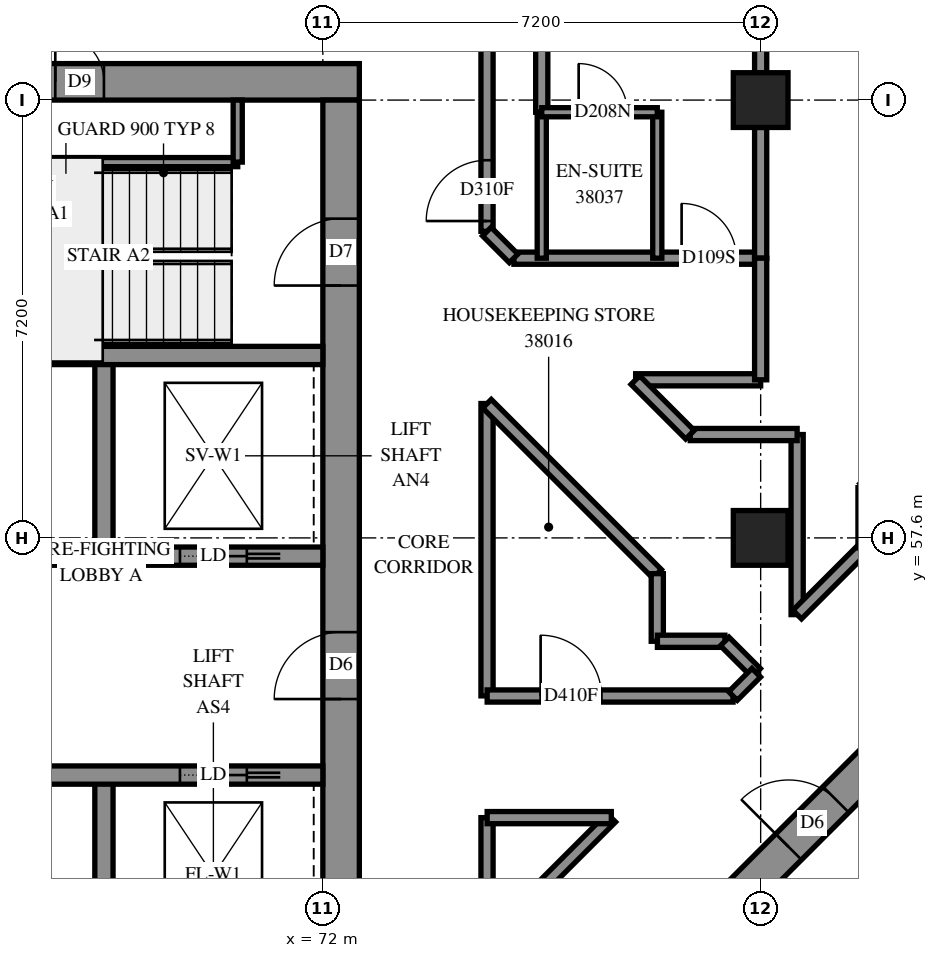
"""IFC4 building model, lengths in metres.
Left out: names, types, materials, properties, quantities, classifications, styles, units other than length and angle.
Written with IfcOpenShell. Run it as: python <this file> out.ifc"""

import sys

from ifc_helpers import new_model, si_unit, direction, frame, frame_2d, origin, origin_2d, place, context, subcontext, project, spatial, rectangle, extrude, element, fill, save


model = new_model("IFC4")
c1 = context("Model", 3, precision=1e-05, world=origin(), true_north=direction((0.0, 1.0)))
c2 = subcontext(c1, "Body", "Model", "MODEL_VIEW")
j1 = project(units=[si_unit("LENGTHUNIT", "METRE"), si_unit("PLANEANGLEUNIT", "RADIAN")], contexts=[c1])
p1 = place(None, origin())
s1 = spatial("IfcSite", under=j1, at=p1, CompositionType="ELEMENT")
p2 = place(p1, origin())
s2 = spatial("IfcBuilding", under=s1, at=p2, CompositionType="ELEMENT")
p3 = place(p2, frame((0.0, 0.0, 142.2)))
s3 = spatial("IfcBuildingStorey", under=s2, at=p3, CompositionType="ELEMENT", Elevation=142.2)
for number, where, z_axis, x_axis in (
    (1, (79.2, 57.6, 0.0), (0.0, 0.0, 1.0), (1.0, 0.0, 0.0)),
    (2, (79.2, 64.8, 0.0), (0.0, 0.0, 1.0), (1.0, 0.0, 0.0)),
):
    element("IfcColumn", number, at=place(p3, frame(where, z_axis=z_axis, x_axis=x_axis)), inside=s3, PredefinedType="COLUMN", context=c2, shape_type="SweptSolid", body=[
        extrude(rectangle(XDim=0.9, YDim=0.9, at=origin_2d()), origin(), (0.0, 0.0, 1.0), 3.1),
    ])
p4 = place(p3, frame((57.0, 65.1, -0.3), z_axis=(0.0, 0.0, 1.0), x_axis=(1.0, 0.0, 0.0)))
e3 = element("IfcWall", 3, at=p4, inside=s3, PredefinedType="SHEAR", context=c2, shape_type="SweptSolid", body=[
    extrude(rectangle(XDim=15.6, YDim=0.6, at=frame_2d((7.8, 0.0))), origin(), (0.0, 0.0, 1.0), 2.7),
])
p5 = place(p4, frame((10.6, 0.0, 0.3)))
e4 = element("IfcOpeningElement", 4, at=p5, cuts=e3, PredefinedType="OPENING", context=c2, shape_type="SweptSolid", body=[
    extrude(rectangle(XDim=0.8, YDim=2.1, at=frame_2d((0.4, 1.05))), frame((0.0, 0.31, 0.0), z_axis=(0.0, -1.0, 0.0), x_axis=(1.0, 0.0, 0.0)), (0.0, 0.0, 1.0), 0.62),
])
p6 = place(p3, frame((72.3, 50.4, -0.3), z_axis=(0.0, 0.0, 1.0), x_axis=(0.0, 1.0, 0.0)))
e5 = element("IfcWall", 5, at=p6, inside=s3, PredefinedType="SHEAR", context=c2, shape_type="SweptSolid", body=[
    extrude(rectangle(XDim=14.4, YDim=0.6, at=frame_2d((7.2, 0.0))), origin(), (0.0, 0.0, 1.0), 2.7),
])
p7 = place(p6, frame((4.55, 0.0, 0.3)))
e6 = element("IfcOpeningElement", 6, at=p7, cuts=e5, PredefinedType="OPENING", context=c2, shape_type="SweptSolid", body=[
    extrude(rectangle(XDim=1.1, YDim=2.1, at=frame_2d((0.55, 1.05))), frame((0.0, 0.31, 0.0), z_axis=(0.0, -1.0, 0.0), x_axis=(1.0, 0.0, 0.0)), (0.0, 0.0, 1.0), 0.62),
])
p8 = place(p6, frame((11.35, 0.0, 0.3)))
e7 = element("IfcOpeningElement", 7, at=p8, cuts=e5, PredefinedType="OPENING", context=c2, shape_type="SweptSolid", body=[
    extrude(rectangle(XDim=1.1, YDim=2.1, at=frame_2d((0.55, 1.05))), frame((0.0, 0.31, 0.0), z_axis=(0.0, -1.0, 0.0), x_axis=(1.0, 0.0, 0.0)), (0.0, 0.0, 1.0), 0.62),
])
for number, where, z_axis, x_axis in (
    (8, (68.4, 50.4, 0.0), (0.0, 0.0, 1.0), (0.0, 1.0, 0.0)),
    (9, (68.4, 57.3, 0.0), (0.0, 0.0, 1.0), (0.0, 1.0, 0.0)),
):
    element("IfcWall", number, at=place(p3, frame(where, z_axis=z_axis, x_axis=x_axis)), inside=s3, PredefinedType="SOLIDWALL", context=c2, shape_type="SweptSolid", body=[
        extrude(rectangle(XDim=3.3, YDim=0.3, at=frame_2d((1.65, 0.0))), origin(), (0.0, 0.0, 1.0), 3.1),
    ])
p9 = place(p3, frame((57.6, 53.7, 0.0), z_axis=(0.0, 0.0, 1.0), x_axis=(1.0, 0.0, 0.0)))
e10 = element("IfcWall", 10, at=p9, inside=s3, PredefinedType="SOLIDWALL", context=c2, shape_type="SweptSolid", body=[
    extrude(rectangle(XDim=14.4, YDim=0.3, at=frame_2d((7.2, 0.0))), origin(), (0.0, 0.0, 1.0), 3.1),
])
p10 = place(p9, frame((1.35, 0.0, 0.0)))
e11 = element("IfcOpeningElement", 11, at=p10, cuts=e10, PredefinedType="OPENING", context=c2, shape_type="SweptSolid", body=[
    extrude(rectangle(XDim=0.9, YDim=2.1, at=frame_2d((0.45, 1.05))), frame((0.0, 0.16, 0.0), z_axis=(0.0, -1.0, 0.0), x_axis=(1.0, 0.0, 0.0)), (0.0, 0.0, 1.0), 0.32),
])
p11 = place(p9, frame((4.95, 0.0, 0.0)))
e12 = element("IfcOpeningElement", 12, at=p11, cuts=e10, PredefinedType="OPENING", context=c2, shape_type="SweptSolid", body=[
    extrude(rectangle(XDim=0.9, YDim=2.1, at=frame_2d((0.45, 1.05))), frame((0.0, 0.16, 0.0), z_axis=(0.0, -1.0, 0.0), x_axis=(1.0, 0.0, 0.0)), (0.0, 0.0, 1.0), 0.32),
])
p12 = place(p9, frame((8.55, 0.0, 0.0)))
e13 = element("IfcOpeningElement", 13, at=p12, cuts=e10, PredefinedType="OPENING", context=c2, shape_type="SweptSolid", body=[
    extrude(rectangle(XDim=0.9, YDim=2.1, at=frame_2d((0.45, 1.05))), frame((0.0, 0.16, 0.0), z_axis=(0.0, -1.0, 0.0), x_axis=(1.0, 0.0, 0.0)), (0.0, 0.0, 1.0), 0.32),
])
p13 = place(p9, frame((12.05, 0.0, 0.0)))
e14 = element("IfcOpeningElement", 14, at=p13, cuts=e10, PredefinedType="OPENING", context=c2, shape_type="SweptSolid", body=[
    extrude(rectangle(XDim=1.1, YDim=2.1, at=frame_2d((0.55, 1.05))), frame((0.0, 0.16, 0.0), z_axis=(0.0, -1.0, 0.0), x_axis=(1.0, 0.0, 0.0)), (0.0, 0.0, 1.0), 0.32),
])
p14 = place(p3, frame((57.6, 57.3, 0.0), z_axis=(0.0, 0.0, 1.0), x_axis=(1.0, 0.0, 0.0)))
e15 = element("IfcWall", 15, at=p14, inside=s3, PredefinedType="SOLIDWALL", context=c2, shape_type="SweptSolid", body=[
    extrude(rectangle(XDim=14.4, YDim=0.3, at=frame_2d((7.2, 0.0))), origin(), (0.0, 0.0, 1.0), 3.1),
])
p15 = place(p14, frame((1.25, 0.0, 0.0)))
e16 = element("IfcOpeningElement", 16, at=p15, cuts=e15, PredefinedType="OPENING", context=c2, shape_type="SweptSolid", body=[
    extrude(rectangle(XDim=1.1, YDim=2.1, at=frame_2d((0.55, 1.05))), frame((0.0, 0.16, 0.0), z_axis=(0.0, -1.0, 0.0), x_axis=(1.0, 0.0, 0.0)), (0.0, 0.0, 1.0), 0.32),
])
p16 = place(p14, frame((4.85, 0.0, 0.0)))
e17 = element("IfcOpeningElement", 17, at=p16, cuts=e15, PredefinedType="OPENING", context=c2, shape_type="SweptSolid", body=[
    extrude(rectangle(XDim=1.1, YDim=2.1, at=frame_2d((0.55, 1.05))), frame((0.0, 0.16, 0.0), z_axis=(0.0, -1.0, 0.0), x_axis=(1.0, 0.0, 0.0)), (0.0, 0.0, 1.0), 0.32),
])
p17 = place(p14, frame((8.45, 0.0, 0.0)))
e18 = element("IfcOpeningElement", 18, at=p17, cuts=e15, PredefinedType="OPENING", context=c2, shape_type="SweptSolid", body=[
    extrude(rectangle(XDim=1.1, YDim=2.1, at=frame_2d((0.55, 1.05))), frame((0.0, 0.16, 0.0), z_axis=(0.0, -1.0, 0.0), x_axis=(1.0, 0.0, 0.0)), (0.0, 0.0, 1.0), 0.32),
])
p18 = place(p14, frame((12.05, 0.0, 0.0)))
e19 = element("IfcOpeningElement", 19, at=p18, cuts=e15, PredefinedType="OPENING", context=c2, shape_type="SweptSolid", body=[
    extrude(rectangle(XDim=1.1, YDim=2.1, at=frame_2d((0.55, 1.05))), frame((0.0, 0.16, 0.0), z_axis=(0.0, -1.0, 0.0), x_axis=(1.0, 0.0, 0.0)), (0.0, 0.0, 1.0), 0.32),
])
p19 = place(p3, frame((64.8, 60.6, 0.0), z_axis=(0.0, 0.0, 1.0), x_axis=(1.0, 0.0, 0.0)))
e20 = element("IfcWall", 20, at=p19, inside=s3, PredefinedType="SOLIDWALL", context=c2, shape_type="SweptSolid", body=[
    extrude(rectangle(XDim=7.2, YDim=0.3, at=frame_2d((3.6, 0.0))), origin(), (0.0, 0.0, 1.0), 3.1),
])
p20 = place(p3, frame((76.442, 49.302, -0.3), z_axis=(0.0, 0.0, 1.0), x_axis=(0.7071067812, 0.7071067812, 0.0)))
e21 = element("IfcWall", 21, at=p20, inside=s3, PredefinedType="SHEAR", context=c2, shape_type="SweptSolid", body=[
    extrude(rectangle(XDim=14.4, YDim=0.6, at=frame_2d((7.2, 0.0))), origin(), (0.0, 0.0, 1.0), 2.7),
])
p21 = place(p20, frame((4.55, 0.0, 0.3)))
e22 = element("IfcOpeningElement", 22, at=p21, cuts=e21, PredefinedType="OPENING", context=c2, shape_type="SweptSolid", body=[
    extrude(rectangle(XDim=1.1, YDim=2.1, at=frame_2d((0.55, 1.05))), frame((0.0, 0.31, 0.0), z_axis=(0.0, -1.0, 0.0), x_axis=(1.0, 0.0, 0.0)), (0.0, 0.0, 1.0), 0.62),
])
p22 = place(p20, frame((11.35, 0.0, 0.3)))
e23 = element("IfcOpeningElement", 23, at=p22, cuts=e21, PredefinedType="OPENING", context=c2, shape_type="SweptSolid", body=[
    extrude(rectangle(XDim=1.1, YDim=2.1, at=frame_2d((0.55, 1.05))), frame((0.0, 0.31, 0.0), z_axis=(0.0, -1.0, 0.0), x_axis=(1.0, 0.0, 0.0)), (0.0, 0.0, 1.0), 0.62),
])
p23 = place(p3, frame((64.95, 63.78, 0.0), z_axis=(0.0, 0.0, 1.0), x_axis=(1.0, 0.0, 0.0)))
e24 = element("IfcWall", 24, at=p23, inside=s3, PredefinedType="PARTITIONING", context=c2, shape_type="SweptSolid", body=[
    extrude(rectangle(XDim=5.65, YDim=0.15, at=frame_2d((2.825, 0.0))), origin(), (0.0, 0.0, 1.0), 3.1),
])
p24 = place(p3, frame((70.6, 63.78, 0.0), z_axis=(0.0, 0.0, 1.0), x_axis=(0.0, 1.0, 0.0)))
e25 = element("IfcWall", 25, at=p24, inside=s3, PredefinedType="PARTITIONING", context=c2, shape_type="SweptSolid", body=[
    extrude(rectangle(XDim=1.02, YDim=0.15, at=frame_2d((0.51, 0.0))), origin(), (0.0, 0.0, 1.0), 3.1),
])
p25 = place(p3, frame((75.6, 64.6, 0.0), z_axis=(0.0, 0.0, 1.0), x_axis=(0.0, 1.0, 0.0)))
e26 = element("IfcWall", 26, at=p25, inside=s3, PredefinedType="PARTITIONING", context=c2, shape_type="SweptSolid", body=[
    extrude(rectangle(XDim=8.165, YDim=0.2, at=frame_2d((4.082, 0.0))), origin(), (0.0, 0.0, 1.0), 3.1),
])
p26 = place(p3, frame((79.2, 65.25, 0.0), z_axis=(0.0, 0.0, 1.0), x_axis=(0.0, 1.0, 0.0)))
e27 = element("IfcWall", 27, at=p26, inside=s3, PredefinedType="PARTITIONING", context=c2, shape_type="SweptSolid", body=[
    extrude(rectangle(XDim=6.3, YDim=0.2, at=frame_2d((3.15, 0.0))), origin(), (0.0, 0.0, 1.0), 3.1),
])
p27 = place(p3, frame((74.7, 62.642, 0.0), z_axis=(0.0, 0.0, 1.0), x_axis=(0.0, 1.0, 0.0)))
e28 = element("IfcWall", 28, at=p27, inside=s3, PredefinedType="PARTITIONING", context=c2, shape_type="SweptSolid", body=[
    extrude(rectangle(XDim=4.858, YDim=0.2, at=frame_2d((2.429, 0.0))), origin(), (0.0, 0.0, 1.0), 3.1),
])
p28 = place(p27, frame((0.169, 0.0, 0.0)))
e29 = element("IfcOpeningElement", 29, at=p28, cuts=e28, PredefinedType="OPENING", context=c2, shape_type="SweptSolid", body=[
    extrude(rectangle(XDim=1.0, YDim=2.1, at=frame_2d((0.5, 1.05))), frame((0.0, 0.11, 0.0), z_axis=(0.0, -1.0, 0.0), x_axis=(1.0, 0.0, 0.0)), (0.0, 0.0, 1.0), 0.22),
])
p29 = place(p3, frame((74.7, 55.002, 0.0), z_axis=(0.0, 0.0, 1.0), x_axis=(0.0, 1.0, 0.0)))
e30 = element("IfcWall", 30, at=p29, inside=s3, PredefinedType="PARTITIONING", context=c2, shape_type="SweptSolid", body=[
    extrude(rectangle(XDim=4.808, YDim=0.2, at=frame_2d((2.404, 0.0))), origin(), (0.0, 0.0, 1.0), 3.1),
])
p30 = place(p3, frame((75.142, 62.2, 0.0), z_axis=(0.0, 0.0, 1.0), x_axis=(1.0, 0.0, 0.0)))
e31 = element("IfcWall", 31, at=p30, inside=s3, PredefinedType="PARTITIONING", context=c2, shape_type="SweptSolid", body=[
    extrude(rectangle(XDim=4.058, YDim=0.2, at=frame_2d((2.029, 0.0))), origin(), (0.0, 0.0, 1.0), 3.1),
])
p31 = place(p30, frame((2.758, 0.0, 0.0)))
e32 = element("IfcOpeningElement", 32, at=p31, cuts=e31, PredefinedType="OPENING", context=c2, shape_type="SweptSolid", body=[
    extrude(rectangle(XDim=0.9, YDim=2.1, at=frame_2d((0.45, 1.05))), frame((0.0, 0.11, 0.0), z_axis=(0.0, -1.0, 0.0), x_axis=(1.0, 0.0, 0.0)), (0.0, 0.0, 1.0), 0.22),
])
p32 = place(p3, frame((74.702, 55.0, 0.0), z_axis=(0.0, 0.0, 1.0), x_axis=(1.0, 0.0, 0.0)))
e33 = element("IfcWall", 33, at=p32, inside=s3, PredefinedType="PARTITIONING", context=c2, shape_type="SweptSolid", body=[
    extrude(rectangle(XDim=4.044, YDim=0.2, at=frame_2d((2.022, 0.0))), origin(), (0.0, 0.0, 1.0), 3.1),
])
p33 = place(p32, frame((0.879, 0.0, 0.0)))
e34 = element("IfcOpeningElement", 34, at=p33, cuts=e33, PredefinedType="OPENING", context=c2, shape_type="SweptSolid", body=[
    extrude(rectangle(XDim=1.0, YDim=2.1, at=frame_2d((0.5, 1.05))), frame((0.0, 0.11, 0.0), z_axis=(0.0, -1.0, 0.0), x_axis=(1.0, 0.0, 0.0)), (0.0, 0.0, 1.0), 0.22),
])
p34 = place(p3, frame((74.699, 59.807, 0.0), z_axis=(0.0, 0.0, 1.0), x_axis=(0.7071067812, -0.7071067812, 0.0)))
e35 = element("IfcWall", 35, at=p34, inside=s3, PredefinedType="PARTITIONING", context=c2, shape_type="SweptSolid", body=[
    extrude(rectangle(XDim=3.957, YDim=0.2, at=frame_2d((1.978, 0.0))), origin(), (0.0, 0.0, 1.0), 3.1),
])
p35 = place(p3, frame((79.8, 56.338, 0.0), z_axis=(0.0, 0.0, 1.0), x_axis=(0.0, 1.0, 0.0)))
e36 = element("IfcWall", 36, at=p35, inside=s3, PredefinedType="PARTITIONING", context=c2, shape_type="SweptSolid", body=[
    extrude(rectangle(XDim=2.962, YDim=0.2, at=frame_2d((1.481, 0.0))), origin(), (0.0, 0.0, 1.0), 3.1),
])
p36 = place(p3, frame((74.701, 50.957, 0.0), z_axis=(0.0, 0.0, 1.0), x_axis=(0.7071067812, 0.7071067812, 0.0)))
e37 = element("IfcWall", 37, at=p36, inside=s3, PredefinedType="PARTITIONING", context=c2, shape_type="SweptSolid", body=[
    extrude(rectangle(XDim=2.888, YDim=0.2, at=frame_2d((1.444, 0.0))), origin(), (0.0, 0.0, 1.0), 3.1),
])
for number, where, z_axis, x_axis in (
    (38, (75.6, 62.2, 0.0), (0.0, 0.0, 1.0), (0.0, 1.0, 0.0)),
    (39, (77.5, 62.2, 0.0), (0.0, 0.0, 1.0), (0.0, 1.0, 0.0)),
):
    element("IfcWall", number, at=place(p3, frame(where, z_axis=z_axis, x_axis=x_axis)), inside=s3, PredefinedType="PARTITIONING", context=c2, shape_type="SweptSolid", body=[
        extrude(rectangle(XDim=2.4, YDim=0.15, at=frame_2d((1.2, 0.0))), origin(), (0.0, 0.0, 1.0), 3.1),
    ])
p37 = place(p3, frame((79.2, 62.2, 0.0), z_axis=(0.0, 0.0, 1.0), x_axis=(0.0, 1.0, 0.0)))
e40 = element("IfcWall", 40, at=p37, inside=s3, PredefinedType="PARTITIONING", context=c2, shape_type="SweptSolid", body=[
    extrude(rectangle(XDim=2.15, YDim=0.2, at=frame_2d((1.075, 0.0))), origin(), (0.0, 0.0, 1.0), 3.1),
])
p38 = place(p3, frame((77.144, 60.2, 0.0), z_axis=(0.0, 0.0, 1.0), x_axis=(1.0, 0.0, 0.0)))
e41 = element("IfcWall", 41, at=p38, inside=s3, PredefinedType="PARTITIONING", context=c2, shape_type="SweptSolid", body=[
    extrude(rectangle(XDim=2.056, YDim=0.2, at=frame_2d((1.028, 0.0))), origin(), (0.0, 0.0, 1.0), 3.1),
])
p39 = place(p3, frame((74.7, 50.956, 0.0), z_axis=(0.0, 0.0, 1.0), x_axis=(0.0, 1.0, 0.0)))
e42 = element("IfcWall", 42, at=p39, inside=s3, PredefinedType="PARTITIONING", context=c2, shape_type="SweptSolid", body=[
    extrude(rectangle(XDim=2.044, YDim=0.2, at=frame_2d((1.022, 0.0))), origin(), (0.0, 0.0, 1.0), 3.1),
])
p40 = place(p3, frame((74.702, 53.0, 0.0), z_axis=(0.0, 0.0, 1.0), x_axis=(1.0, 0.0, 0.0)))
e43 = element("IfcWall", 43, at=p40, inside=s3, PredefinedType="PARTITIONING", context=c2, shape_type="SweptSolid", body=[
    extrude(rectangle(XDim=2.042, YDim=0.2, at=frame_2d((1.021, 0.0))), origin(), (0.0, 0.0, 1.0), 3.1),
])
p41 = place(p3, frame((79.2, 60.2, 0.0), z_axis=(0.0, 0.0, 1.0), x_axis=(0.0, 1.0, 0.0)))
e44 = element("IfcWall", 44, at=p41, inside=s3, PredefinedType="PARTITIONING", context=c2, shape_type="SweptSolid", body=[
    extrude(rectangle(XDim=2.0, YDim=0.2, at=frame_2d((1.0, 0.0))), origin(), (0.0, 0.0, 1.0), 3.1),
])
p42 = place(p3, frame((75.6, 64.6, 0.0), z_axis=(0.0, 0.0, 1.0), x_axis=(1.0, 0.0, 0.0)))
e45 = element("IfcWall", 45, at=p42, inside=s3, PredefinedType="PARTITIONING", context=c2, shape_type="SweptSolid", body=[
    extrude(rectangle(XDim=1.9, YDim=0.15, at=frame_2d((0.95, 0.0))), origin(), (0.0, 0.0, 1.0), 3.1),
])
p43 = place(p42, frame((0.607, 0.0, 0.0)))
e46 = element("IfcOpeningElement", 46, at=p43, cuts=e45, PredefinedType="OPENING", context=c2, shape_type="SweptSolid", body=[
    extrude(rectangle(XDim=0.8, YDim=2.1, at=frame_2d((0.4, 1.05))), frame((0.0, 0.085, 0.0), z_axis=(0.0, -1.0, 0.0), x_axis=(1.0, 0.0, 0.0)), (0.0, 0.0, 1.0), 0.17),
])
p44 = place(p3, frame((78.042, 59.3, 0.0), z_axis=(0.0, 0.0, 1.0), x_axis=(1.0, 0.0, 0.0)))
e47 = element("IfcWall", 47, at=p44, inside=s3, PredefinedType="PARTITIONING", context=c2, shape_type="SweptSolid", body=[
    extrude(rectangle(XDim=1.758, YDim=0.2, at=frame_2d((0.879, 0.0))), origin(), (0.0, 0.0, 1.0), 3.1),
])
p45 = place(p3, frame((79.801, 56.339, 0.0), z_axis=(0.0, 0.0, 1.0), x_axis=(0.7071067812, 0.7071067812, 0.0)))
e48 = element("IfcWall", 48, at=p45, inside=s3, PredefinedType="PARTITIONING", context=c2, shape_type="SweptSolid", body=[
    extrude(rectangle(XDim=1.553, YDim=0.2, at=frame_2d((0.776, 0.0))), origin(), (0.0, 0.0, 1.0), 3.1),
])
p46 = place(p3, frame((77.139, 60.195, 0.0), z_axis=(0.0, 0.0, 1.0), x_axis=(0.7071067812, -0.7071067812, 0.0)))
e49 = element("IfcWall", 49, at=p46, inside=s3, PredefinedType="PARTITIONING", context=c2, shape_type="SweptSolid", body=[
    extrude(rectangle(XDim=1.27, YDim=0.2, at=frame_2d((0.635, 0.0))), origin(), (0.0, 0.0, 1.0), 3.1),
])
p47 = place(p3, frame((77.5, 55.9, 0.0), z_axis=(0.0, 0.0, 1.0), x_axis=(0.0, 1.0, 0.0)))
e50 = element("IfcWall", 50, at=p47, inside=s3, PredefinedType="PARTITIONING", context=c2, shape_type="SweptSolid", body=[
    extrude(rectangle(XDim=1.112, YDim=0.2, at=frame_2d((0.556, 0.0))), origin(), (0.0, 0.0, 1.0), 3.1),
])
p48 = place(p3, frame((77.502, 55.9, 0.0), z_axis=(0.0, 0.0, 1.0), x_axis=(1.0, 0.0, 0.0)))
e51 = element("IfcWall", 51, at=p48, inside=s3, PredefinedType="PARTITIONING", context=c2, shape_type="SweptSolid", body=[
    extrude(rectangle(XDim=1.11, YDim=0.2, at=frame_2d((0.555, 0.0))), origin(), (0.0, 0.0, 1.0), 3.1),
])
p49 = place(p3, frame((78.609, 55.897, 0.0), z_axis=(0.0, 0.0, 1.0), x_axis=(0.7071067812, -0.7071067812, 0.0)))
e52 = element("IfcWall", 52, at=p49, inside=s3, PredefinedType="PARTITIONING", context=c2, shape_type="SweptSolid", body=[
    extrude(rectangle(XDim=0.73, YDim=0.2, at=frame_2d((0.365, 0.0))), origin(), (0.0, 0.0, 1.0), 3.1),
])
p50 = place(p3, frame((74.697, 62.637, 0.0), z_axis=(0.0, 0.0, 1.0), x_axis=(0.7071067812, -0.7071067812, 0.0)))
e53 = element("IfcWall", 53, at=p50, inside=s3, PredefinedType="PARTITIONING", context=c2, shape_type="SweptSolid", body=[
    extrude(rectangle(XDim=0.622, YDim=0.2, at=frame_2d((0.311, 0.0))), origin(), (0.0, 0.0, 1.0), 3.1),
])
p51 = place(p3, frame((78.745, 55.001, 0.0), z_axis=(0.0, 0.0, 1.0), x_axis=(0.7071067812, 0.7071067812, 0.0)))
e54 = element("IfcWall", 54, at=p51, inside=s3, PredefinedType="PARTITIONING", context=c2, shape_type="SweptSolid", body=[
    extrude(rectangle(XDim=0.54, YDim=0.2, at=frame_2d((0.27, 0.0))), origin(), (0.0, 0.0, 1.0), 3.1),
])
p52 = place(p5, origin())
e55 = element("IfcDoor", 55, at=p52, inside=s3, OperationType="SINGLE_SWING_RIGHT", PredefinedType="DOOR", context=c2, shape_type="SweptSolid", body=[
    extrude(rectangle(XDim=0.8, YDim=2.1, at=frame_2d((0.4, 1.05))), frame((0.0, 0.025, 0.0), z_axis=(0.0, -1.0, 0.0), x_axis=(1.0, 0.0, 0.0)), (0.0, 0.0, 1.0), 0.05),
])
fill(e4, e55)
p53 = place(p7, origin())
e56 = element("IfcDoor", 56, at=p53, inside=s3, OperationType="DOUBLE_DOOR_SINGLE_SWING", PredefinedType="DOOR", context=c2, shape_type="SweptSolid", body=[
    extrude(rectangle(XDim=1.1, YDim=2.1, at=frame_2d((0.55, 1.05))), frame((0.0, 0.025, 0.0), z_axis=(0.0, -1.0, 0.0), x_axis=(1.0, 0.0, 0.0)), (0.0, 0.0, 1.0), 0.05),
])
fill(e6, e56)
p54 = place(p8, origin())
e57 = element("IfcDoor", 57, at=p54, inside=s3, OperationType="SINGLE_SWING_RIGHT", PredefinedType="DOOR", context=c2, shape_type="SweptSolid", body=[
    extrude(rectangle(XDim=1.1, YDim=2.1, at=frame_2d((0.55, 1.05))), frame((0.0, 0.025, 0.0), z_axis=(0.0, -1.0, 0.0), x_axis=(1.0, 0.0, 0.0)), (0.0, 0.0, 1.0), 0.05),
])
fill(e7, e57)
p55 = place(p13, origin())
e58 = element("IfcDoor", 58, at=p55, inside=s3, OperationType="SLIDING_TO_RIGHT", PredefinedType="DOOR", context=c2, shape_type="SweptSolid", body=[
    extrude(rectangle(XDim=1.1, YDim=2.1, at=frame_2d((0.55, 1.05))), frame((0.0, 0.025, 0.0), z_axis=(0.0, -1.0, 0.0), x_axis=(1.0, 0.0, 0.0)), (0.0, 0.0, 1.0), 0.05),
])
fill(e14, e58)
p56 = place(p18, origin())
e59 = element("IfcDoor", 59, at=p56, inside=s3, OperationType="SLIDING_TO_RIGHT", PredefinedType="DOOR", context=c2, shape_type="SweptSolid", body=[
    extrude(rectangle(XDim=1.1, YDim=2.1, at=frame_2d((0.55, 1.05))), frame((0.0, 0.025, 0.0), z_axis=(0.0, -1.0, 0.0), x_axis=(1.0, 0.0, 0.0)), (0.0, 0.0, 1.0), 0.05),
])
fill(e19, e59)
p57 = place(p21, origin())
e60 = element("IfcDoor", 60, at=p57, inside=s3, OperationType="DOUBLE_DOOR_SINGLE_SWING", PredefinedType="DOOR", context=c2, shape_type="SweptSolid", body=[
    extrude(rectangle(XDim=1.1, YDim=2.1, at=frame_2d((0.55, 1.05))), frame((0.0, 0.025, 0.0), z_axis=(0.0, -1.0, 0.0), x_axis=(1.0, 0.0, 0.0)), (0.0, 0.0, 1.0), 0.05),
])
fill(e22, e60)
p58 = place(p33, origin())
e61 = element("IfcDoor", 61, at=p58, inside=s3, OperationType="SINGLE_SWING_LEFT", PredefinedType="DOOR", context=c2, shape_type="SweptSolid", body=[
    extrude(rectangle(XDim=1.0, YDim=2.1, at=frame_2d((0.5, 1.05))), frame((0.0, 0.025, 0.0), z_axis=(0.0, -1.0, 0.0), x_axis=(1.0, 0.0, 0.0)), (0.0, 0.0, 1.0), 0.05),
])
fill(e34, e61)
p59 = place(p28, origin())
e62 = element("IfcDoor", 62, at=p59, inside=s3, OperationType="SINGLE_SWING_RIGHT", PredefinedType="DOOR", context=c2, shape_type="SweptSolid", body=[
    extrude(rectangle(XDim=1.0, YDim=2.1, at=frame_2d((0.5, 1.05))), frame((0.0, 0.025, 0.0), z_axis=(0.0, -1.0, 0.0), x_axis=(1.0, 0.0, 0.0)), (0.0, 0.0, 1.0), 0.05),
])
fill(e29, e62)
p60 = place(p31, origin())
e63 = element("IfcDoor", 63, at=p60, inside=s3, OperationType="SINGLE_SWING_LEFT", PredefinedType="DOOR", context=c2, shape_type="SweptSolid", body=[
    extrude(rectangle(XDim=0.9, YDim=2.1, at=frame_2d((0.45, 1.05))), frame((0.0, 0.025, 0.0), z_axis=(0.0, -1.0, 0.0), x_axis=(1.0, 0.0, 0.0)), (0.0, 0.0, 1.0), 0.05),
])
fill(e32, e63)
p61 = place(p43, origin())
e64 = element("IfcDoor", 64, at=p61, inside=s3, OperationType="SINGLE_SWING_RIGHT", PredefinedType="DOOR", context=c2, shape_type="SweptSolid", body=[
    extrude(rectangle(XDim=0.8, YDim=2.1, at=frame_2d((0.4, 1.05))), frame((0.0, 0.025, 0.0), z_axis=(0.0, -1.0, 0.0), x_axis=(1.0, 0.0, 0.0)), (0.0, 0.0, 1.0), 0.05),
])
fill(e46, e64)
save(model, sys.argv[1])
